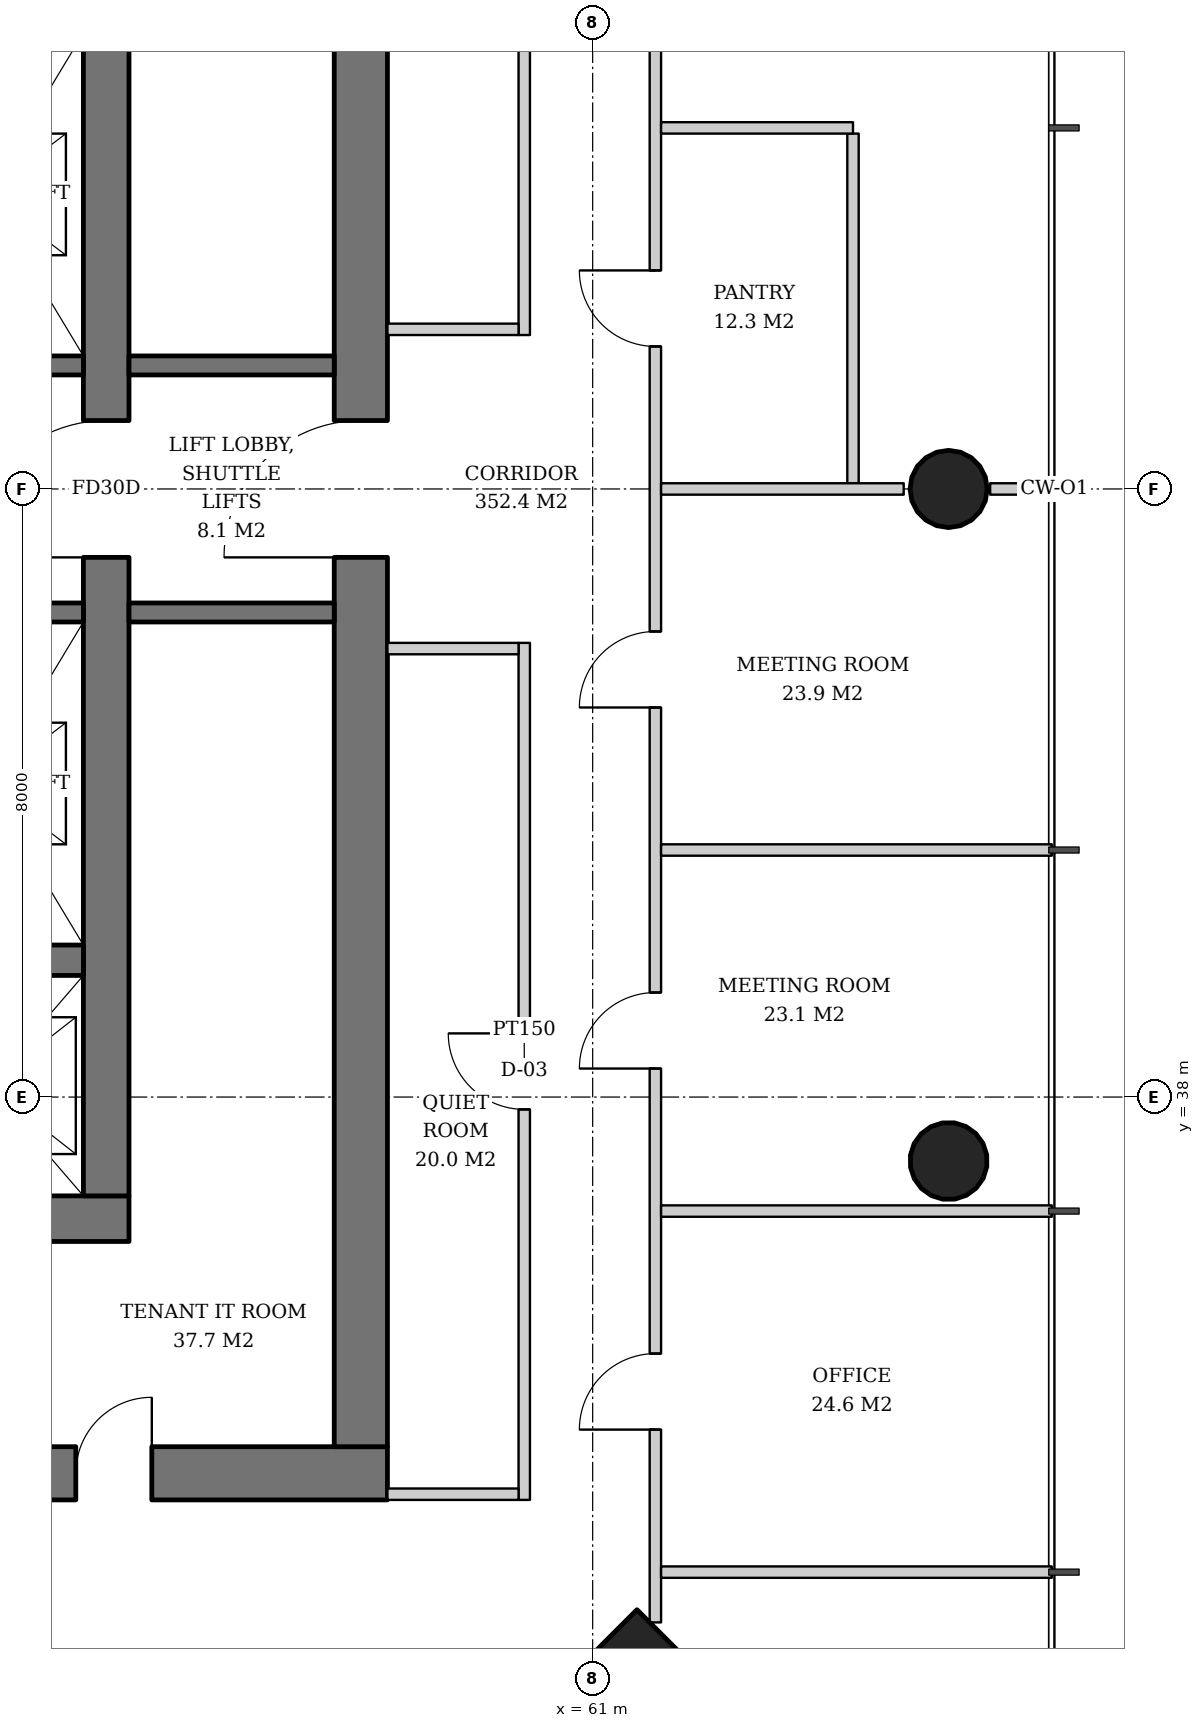
"""IFC4 building model, lengths in metres.
Left out: names, types, materials, properties, quantities, classifications, styles, units other than length and angle.
Written with IfcOpenShell. Run it as: python <this file> out.ifc"""

import sys

from ifc_helpers import new_model, si_unit, direction, frame, frame_2d, origin, origin_2d, place, context, subcontext, project, spatial, rectangle, hollow_circle, extrude, element, fill, save


model = new_model("IFC4")
c1 = context("Model", 3, precision=1e-05, world=origin(), true_north=direction((0.0, 1.0)))
c2 = subcontext(c1, "Body", "Model", "MODEL_VIEW")
j1 = project(units=[si_unit("LENGTHUNIT", "METRE"), si_unit("PLANEANGLEUNIT", "RADIAN")], contexts=[c1])
p1 = place(None, origin())
s1 = spatial("IfcSite", under=j1, at=p1, CompositionType="ELEMENT")
p2 = place(p1, origin())
s2 = spatial("IfcBuilding", under=s1, at=p2, CompositionType="ELEMENT")
p3 = place(p2, frame((0.0, 0.0, 123.6)))
s3 = spatial("IfcBuildingStorey", under=s2, at=p3, CompositionType="ELEMENT", Elevation=123.6)
p4 = place(p3, frame((65.721, 37.139, 0.0), z_axis=(-0.031912349901, 0.015924069971, 0.999363810591), x_axis=(-0.446493300058, -0.894786976326, 0.0)))
e1 = element("IfcColumn", 1, at=p4, inside=s3, PredefinedType="COLUMN", context=c2, shape_type="SweptSolid", body=[
    extrude(hollow_circle(Radius=0.508, WallThickness=0.04, at=origin_2d()), origin(), (0.0, 0.0, 1.0), 3.802),
])
p5 = place(p3, frame((65.721, 46.0, 0.0), z_axis=(-0.031916396774, 0.0, 0.999490542035), x_axis=(0.0, -1.0, 0.0)))
e2 = element("IfcColumn", 2, at=p5, inside=s3, PredefinedType="COLUMN", context=c2, shape_type="SweptSolid", body=[
    extrude(hollow_circle(Radius=0.508, WallThickness=0.04, at=origin_2d()), origin(), (0.0, 0.0, 1.0), 3.802),
])
p6 = place(p3, frame((61.621, 29.379, 0.0), z_axis=(-0.031900153262, 0.031900153262, 0.998981861919), x_axis=(-0.707106781187, -0.707106781187, 0.0)))
e3 = element("IfcColumn", 3, at=p6, inside=s3, PredefinedType="COLUMN", context=c2, shape_type="SweptSolid", body=[
    extrude(rectangle(XDim=2.6, YDim=2.6, at=origin_2d()), origin(), (0.0, 0.0, 1.0), 3.804),
])
p7 = place(p3, frame((35.1, 36.4, 0.0), z_axis=(0.0, 0.0, 1.0), x_axis=(1.0, 0.0, 0.0)))
e4 = element("IfcWall", 4, at=p7, inside=s3, PredefinedType="SHEAR", context=c2, shape_type="SweptSolid", body=[
    extrude(rectangle(XDim=19.8, YDim=0.6, at=frame_2d((9.9, 0.0))), origin(), (0.0, 0.0, 1.0), 3.8),
])
p8 = place(p7, frame((3.9, 0.0, 0.0)))
e5 = element("IfcOpeningElement", 5, at=p8, cuts=e4, PredefinedType="OPENING", context=c2, shape_type="SweptSolid", body=[
    extrude(rectangle(XDim=1.0, YDim=2.1, at=frame_2d((0.5, 1.05))), frame((0.0, 0.31, 0.0), z_axis=(0.0, -1.0, 0.0), x_axis=(1.0, 0.0, 0.0)), (0.0, 0.0, 1.0), 0.62),
])
p9 = place(p7, frame((15.35, 0.0, 0.0)))
e6 = element("IfcOpeningElement", 6, at=p9, cuts=e4, PredefinedType="OPENING", context=c2, shape_type="SweptSolid", body=[
    extrude(rectangle(XDim=1.0, YDim=2.1, at=frame_2d((0.5, 1.05))), frame((0.0, 0.31, 0.0), z_axis=(0.0, -1.0, 0.0), x_axis=(1.0, 0.0, 0.0)), (0.0, 0.0, 1.0), 0.62),
])
p10 = place(p3, frame((54.6, 36.7, 0.0), z_axis=(0.0, 0.0, 1.0), x_axis=(0.0, 1.0, 0.0)))
e7 = element("IfcWall", 7, at=p10, inside=s3, PredefinedType="SHEAR", context=c2, shape_type="SweptSolid", body=[
    extrude(rectangle(XDim=18.6, YDim=0.6, at=frame_2d((9.3, 0.0))), origin(), (0.0, 0.0, 1.0), 3.8),
])
p11 = place(p10, frame((8.4, 0.0, 0.0)))
e8 = element("IfcOpeningElement", 8, at=p11, cuts=e7, PredefinedType="OPENING", context=c2, shape_type="SweptSolid", body=[
    extrude(rectangle(XDim=1.8, YDim=2.4, at=frame_2d((0.9, 1.2))), frame((0.0, 0.31, 0.0), z_axis=(0.0, -1.0, 0.0), x_axis=(1.0, 0.0, 0.0)), (0.0, 0.0, 1.0), 0.62),
])
p12 = place(p3, frame((31.7, 33.05, 0.0), z_axis=(0.0, 0.0, 1.0), x_axis=(1.0, 0.0, 0.0)))
e9 = element("IfcWall", 9, at=p12, inside=s3, PredefinedType="SHEAR", context=c2, shape_type="SweptSolid", body=[
    extrude(rectangle(XDim=26.6, YDim=0.7, at=frame_2d((13.3, 0.0))), origin(), (0.0, 0.0, 1.0), 3.8),
])
p13 = place(p12, frame((7.3, 0.0, 0.0)))
e10 = element("IfcOpeningElement", 10, at=p13, cuts=e9, PredefinedType="OPENING", context=c2, shape_type="SweptSolid", body=[
    extrude(rectangle(XDim=1.0, YDim=2.1, at=frame_2d((0.5, 1.05))), frame((0.0, 0.36, 0.0), z_axis=(0.0, -1.0, 0.0), x_axis=(1.0, 0.0, 0.0)), (0.0, 0.0, 1.0), 0.72),
])
p14 = place(p12, frame((18.75, 0.0, 0.0)))
e11 = element("IfcOpeningElement", 11, at=p14, cuts=e9, PredefinedType="OPENING", context=c2, shape_type="SweptSolid", body=[
    extrude(rectangle(XDim=1.0, YDim=2.1, at=frame_2d((0.5, 1.05))), frame((0.0, 0.36, 0.0), z_axis=(0.0, -1.0, 0.0), x_axis=(1.0, 0.0, 0.0)), (0.0, 0.0, 1.0), 0.72),
])
p15 = place(p12, frame((3.2, 0.0, 0.0)))
e12 = element("IfcOpeningElement", 12, at=p15, cuts=e9, PredefinedType="OPENING", context=c2, shape_type="SweptSolid", body=[
    extrude(rectangle(XDim=1.0, YDim=2.1, at=frame_2d((0.5, 1.05))), frame((0.0, 0.36, 0.0), z_axis=(0.0, -1.0, 0.0), x_axis=(1.0, 0.0, 0.0)), (0.0, 0.0, 1.0), 0.72),
])
p16 = place(p12, frame((10.42, 0.0, 0.0)))
e13 = element("IfcOpeningElement", 13, at=p16, cuts=e9, PredefinedType="OPENING", context=c2, shape_type="SweptSolid", body=[
    extrude(rectangle(XDim=1.0, YDim=2.1, at=frame_2d((0.5, 1.05))), frame((0.0, 0.36, 0.0), z_axis=(0.0, -1.0, 0.0), x_axis=(1.0, 0.0, 0.0)), (0.0, 0.0, 1.0), 0.72),
])
p17 = place(p12, frame((14.46, 0.0, 0.0)))
e14 = element("IfcOpeningElement", 14, at=p17, cuts=e9, PredefinedType="OPENING", context=c2, shape_type="SweptSolid", body=[
    extrude(rectangle(XDim=1.0, YDim=2.1, at=frame_2d((0.5, 1.05))), frame((0.0, 0.36, 0.0), z_axis=(0.0, -1.0, 0.0), x_axis=(1.0, 0.0, 0.0)), (0.0, 0.0, 1.0), 0.72),
])
p18 = place(p12, frame((22.5, 0.0, 0.0)))
e15 = element("IfcOpeningElement", 15, at=p18, cuts=e9, PredefinedType="OPENING", context=c2, shape_type="SweptSolid", body=[
    extrude(rectangle(XDim=1.0, YDim=2.1, at=frame_2d((0.5, 1.05))), frame((0.0, 0.36, 0.0), z_axis=(0.0, -1.0, 0.0), x_axis=(1.0, 0.0, 0.0)), (0.0, 0.0, 1.0), 0.72),
])
p19 = place(p3, frame((57.95, 33.4, 0.0), z_axis=(0.0, 0.0, 1.0), x_axis=(0.0, 1.0, 0.0)))
e16 = element("IfcWall", 16, at=p19, inside=s3, PredefinedType="SHEAR", context=c2, shape_type="SweptSolid", body=[
    extrude(rectangle(XDim=25.2, YDim=0.7, at=frame_2d((12.6, 0.0))), origin(), (0.0, 0.0, 1.0), 3.8),
])
p20 = place(p19, frame((11.7, 0.0, 0.0)))
e17 = element("IfcOpeningElement", 17, at=p20, cuts=e16, PredefinedType="OPENING", context=c2, shape_type="SweptSolid", body=[
    extrude(rectangle(XDim=1.8, YDim=2.4, at=frame_2d((0.9, 1.2))), frame((0.0, 0.36, 0.0), z_axis=(0.0, -1.0, 0.0), x_axis=(1.0, 0.0, 0.0)), (0.0, 0.0, 1.0), 0.72),
])
p21 = place(p3, frame((35.7, 39.8, 0.0), z_axis=(0.0, 0.0, 1.0), x_axis=(1.0, 0.0, 0.0)))
e18 = element("IfcWall", 18, at=p21, inside=s3, PredefinedType="SHEAR", context=c2, shape_type="SweptSolid", body=[
    extrude(rectangle(XDim=18.6, YDim=0.4, at=frame_2d((9.3, 0.0))), origin(), (0.0, 0.0, 1.0), 3.8),
])
for number, where, z_axis, x_axis in (
    (19, (48.93, 47.625, 0.0), (0.0, 0.0, 1.0), (1.0, 0.0, 0.0)),
    (20, (48.93, 44.375, 0.0), (0.0, 0.0, 1.0), (1.0, 0.0, 0.0)),
):
    element("IfcWall", number, at=place(p3, frame(where, z_axis=z_axis, x_axis=x_axis)), inside=s3, PredefinedType="SHEAR", context=c2, shape_type="SweptSolid", body=[
        extrude(rectangle(XDim=5.37, YDim=0.25, at=frame_2d((2.685, 0.0))), origin(), (0.0, 0.0, 1.0), 3.8),
    ])
for number, where, z_axis, x_axis in (
    (21, (54.9, 44.375, 0.0), (0.0, 0.0, 1.0), (1.0, 0.0, 0.0)),
    (22, (54.9, 47.625, 0.0), (0.0, 0.0, 1.0), (1.0, 0.0, 0.0)),
):
    element("IfcWall", number, at=place(p3, frame(where, z_axis=z_axis, x_axis=x_axis)), inside=s3, PredefinedType="SOLIDWALL", context=c2, shape_type="SweptSolid", body=[
        extrude(rectangle(XDim=2.7, YDim=0.25, at=frame_2d((1.35, 0.0))), origin(), (0.0, 0.0, 1.0), 3.62),
    ])
p22 = place(p3, frame((60.1, 32.7, 0.0), z_axis=(0.0, 0.0, 1.0), x_axis=(0.0, 1.0, 0.0)))
e23 = element("IfcWall", 23, at=p22, inside=s3, PredefinedType="PARTITIONING", context=c2, shape_type="SweptSolid", body=[
    extrude(rectangle(XDim=11.275, YDim=0.15, at=frame_2d((5.638, 0.0))), origin(), (0.0, 0.0, 1.0), 2.72),
])
p23 = place(p22, frame((5.137, 0.0, 0.0)))
e24 = element("IfcOpeningElement", 24, at=p23, cuts=e23, PredefinedType="OPENING", context=c2, shape_type="SweptSolid", body=[
    extrude(rectangle(XDim=1.0, YDim=2.1, at=frame_2d((0.5, 1.05))), frame((0.0, 0.085, 0.0), z_axis=(0.0, -1.0, 0.0), x_axis=(1.0, 0.0, 0.0)), (0.0, 0.0, 1.0), 0.17),
])
for number, where, z_axis, x_axis in (
    (25, (58.3, 32.775, 0.0), (0.0, 0.0, 1.0), (1.0, 0.0, 0.0)),
    (26, (58.3, 43.9, 0.0), (0.0, 0.0, 1.0), (1.0, 0.0, 0.0)),
):
    element("IfcWall", number, at=place(p3, frame(where, z_axis=z_axis, x_axis=x_axis)), inside=s3, PredefinedType="PARTITIONING", context=c2, shape_type="SweptSolid", body=[
        extrude(rectangle(XDim=1.725, YDim=0.15, at=frame_2d((0.862, 0.0))), origin(), (0.0, 0.0, 1.0), 3.62),
    ])
p24 = place(p3, frame((60.1, 48.025, 0.0), z_axis=(0.0, 0.0, 1.0), x_axis=(0.0, 1.0, 0.0)))
e27 = element("IfcWall", 27, at=p24, inside=s3, PredefinedType="PARTITIONING", context=c2, shape_type="SweptSolid", body=[
    extrude(rectangle(XDim=11.275, YDim=0.15, at=frame_2d((5.638, 0.0))), origin(), (0.0, 0.0, 1.0), 2.806),
])
p25 = place(p24, frame((5.137, 0.0, 0.0)))
e28 = element("IfcOpeningElement", 28, at=p25, cuts=e27, PredefinedType="OPENING", context=c2, shape_type="SweptSolid", body=[
    extrude(rectangle(XDim=1.0, YDim=2.1, at=frame_2d((0.5, 1.05))), frame((0.0, 0.085, 0.0), z_axis=(0.0, -1.0, 0.0), x_axis=(1.0, 0.0, 0.0)), (0.0, 0.0, 1.0), 0.17),
])
p26 = place(p3, frame((58.3, 48.1, 0.0), z_axis=(0.0, 0.0, 1.0), x_axis=(1.0, 0.0, 0.0)))
e29 = element("IfcWall", 29, at=p26, inside=s3, PredefinedType="PARTITIONING", context=c2, shape_type="SweptSolid", body=[
    extrude(rectangle(XDim=1.725, YDim=0.15, at=frame_2d((0.862, 0.0))), origin(), (0.0, 0.0, 1.0), 3.62),
])
p27 = place(p3, frame((64.425, 46.075, 0.0), z_axis=(0.0, 0.0, 1.0), x_axis=(0.0, 1.0, 0.0)))
e30 = element("IfcWall", 30, at=p27, inside=s3, PredefinedType="PARTITIONING", context=c2, shape_type="SweptSolid", body=[
    extrude(rectangle(XDim=4.6, YDim=0.15, at=frame_2d((2.3, 0.0))), origin(), (0.0, 0.0, 1.0), 2.858),
])
p28 = place(p3, frame((61.825, 31.088, 0.0), z_axis=(0.0, 0.0, 1.0), x_axis=(0.0, 1.0, 0.0)))
e31 = element("IfcWall", 31, at=p28, inside=s3, PredefinedType="PARTITIONING", context=c2, shape_type="SweptSolid", body=[
    extrude(rectangle(XDim=29.823, YDim=0.15, at=frame_2d((14.912, 0.0))), origin(), (0.0, 0.0, 1.0), 2.72),
])
p29 = place(p28, frame((2.537, 0.0, 0.0)))
e32 = element("IfcOpeningElement", 32, at=p29, cuts=e31, PredefinedType="OPENING", context=c2, shape_type="SweptSolid", body=[
    extrude(rectangle(XDim=1.0, YDim=2.1, at=frame_2d((0.5, 1.05))), frame((0.0, 0.085, 0.0), z_axis=(0.0, -1.0, 0.0), x_axis=(1.0, 0.0, 0.0)), (0.0, 0.0, 1.0), 0.17),
])
p30 = place(p28, frame((7.287, 0.0, 0.0)))
e33 = element("IfcOpeningElement", 33, at=p30, cuts=e31, PredefinedType="OPENING", context=c2, shape_type="SweptSolid", body=[
    extrude(rectangle(XDim=1.0, YDim=2.1, at=frame_2d((0.5, 1.05))), frame((0.0, 0.085, 0.0), z_axis=(0.0, -1.0, 0.0), x_axis=(1.0, 0.0, 0.0)), (0.0, 0.0, 1.0), 0.17),
])
p31 = place(p28, frame((12.037, 0.0, 0.0)))
e34 = element("IfcOpeningElement", 34, at=p31, cuts=e31, PredefinedType="OPENING", context=c2, shape_type="SweptSolid", body=[
    extrude(rectangle(XDim=1.0, YDim=2.1, at=frame_2d((0.5, 1.05))), frame((0.0, 0.085, 0.0), z_axis=(0.0, -1.0, 0.0), x_axis=(1.0, 0.0, 0.0)), (0.0, 0.0, 1.0), 0.17),
])
p32 = place(p28, frame((16.787, 0.0, 0.0)))
e35 = element("IfcOpeningElement", 35, at=p32, cuts=e31, PredefinedType="OPENING", context=c2, shape_type="SweptSolid", body=[
    extrude(rectangle(XDim=1.0, YDim=2.1, at=frame_2d((0.5, 1.05))), frame((0.0, 0.085, 0.0), z_axis=(0.0, -1.0, 0.0), x_axis=(1.0, 0.0, 0.0)), (0.0, 0.0, 1.0), 0.17),
])
p33 = place(p28, frame((21.537, 0.0, 0.0)))
e36 = element("IfcOpeningElement", 36, at=p33, cuts=e31, PredefinedType="OPENING", context=c2, shape_type="SweptSolid", body=[
    extrude(rectangle(XDim=1.0, YDim=2.1, at=frame_2d((0.5, 1.05))), frame((0.0, 0.085, 0.0), z_axis=(0.0, -1.0, 0.0), x_axis=(1.0, 0.0, 0.0)), (0.0, 0.0, 1.0), 0.17),
])
for number, where, z_axis, x_axis in (
    (37, (61.9, 31.75, 0.0), (0.0, 0.0, 1.0), (1.0, 0.0, 0.0)),
    (38, (61.9, 36.5, 0.0), (0.0, 0.0, 1.0), (1.0, 0.0, 0.0)),
):
    element("IfcWall", number, at=place(p3, frame(where, z_axis=z_axis, x_axis=x_axis)), inside=s3, PredefinedType="PARTITIONING", context=c2, shape_type="SweptSolid", body=[
        extrude(rectangle(XDim=5.14, YDim=0.15, at=frame_2d((2.57, 0.0))), origin(), (0.0, 0.0, 1.0), 2.82),
    ])
p34 = place(p3, frame((61.9, 41.25, 0.0), z_axis=(0.0, 0.0, 1.0), x_axis=(1.0, 0.0, 0.0)))
e39 = element("IfcWall", 39, at=p34, inside=s3, PredefinedType="PARTITIONING", context=c2, shape_type="SweptSolid", body=[
    extrude(rectangle(XDim=5.14, YDim=0.15, at=frame_2d((2.57, 0.0))), origin(), (0.0, 0.0, 1.0), 2.67),
])
p35 = place(p3, frame((61.9, 46.0, 0.0), z_axis=(0.0, 0.0, 1.0), x_axis=(1.0, 0.0, 0.0)))
e40 = element("IfcWall", 40, at=p35, inside=s3, PredefinedType="PARTITIONING", context=c2, shape_type="SweptSolid", body=[
    extrude(rectangle(XDim=3.192, YDim=0.15, at=frame_2d((1.596, 0.0))), origin(), (0.0, 0.0, 1.0), 2.67),
])
p36 = place(p3, frame((66.229, 46.0, 0.0), z_axis=(0.0, 0.0, 1.0), x_axis=(1.0, 0.0, 0.0)))
e41 = element("IfcWall", 41, at=p36, inside=s3, PredefinedType="PARTITIONING", context=c2, shape_type="SweptSolid", body=[
    extrude(rectangle(XDim=0.811, YDim=0.15, at=frame_2d((0.405, 0.0))), origin(), (0.0, 0.0, 1.0), 2.67),
])
p37 = place(p3, frame((61.9, 50.75, 0.0), z_axis=(0.0, 0.0, 1.0), x_axis=(1.0, 0.0, 0.0)))
e42 = element("IfcWall", 42, at=p37, inside=s3, PredefinedType="PARTITIONING", context=c2, shape_type="SweptSolid", body=[
    extrude(rectangle(XDim=2.525, YDim=0.15, at=frame_2d((1.263, 0.0))), origin(), (0.0, 0.0, 1.0), 3.62),
])
p38 = place(p11, origin())
e43 = element("IfcDoor", 43, at=p38, inside=s3, OperationType="DOUBLE_DOOR_SINGLE_SWING", PredefinedType="DOOR", context=c2, shape_type="SweptSolid", body=[
    extrude(rectangle(XDim=1.8, YDim=2.4, at=frame_2d((0.9, 1.2))), frame((0.0, 0.025, 0.0), z_axis=(0.0, -1.0, 0.0), x_axis=(1.0, 0.0, 0.0)), (0.0, 0.0, 1.0), 0.05),
])
fill(e8, e43)
p39 = place(p20, origin())
e44 = element("IfcDoor", 44, at=p39, inside=s3, OperationType="DOUBLE_DOOR_SINGLE_SWING", PredefinedType="DOOR", context=c2, shape_type="SweptSolid", body=[
    extrude(rectangle(XDim=1.8, YDim=2.4, at=frame_2d((0.9, 1.2))), frame((0.0, 0.025, 0.0), z_axis=(0.0, -1.0, 0.0), x_axis=(1.0, 0.0, 0.0)), (0.0, 0.0, 1.0), 0.05),
])
fill(e17, e44)
p40 = place(p18, origin())
e45 = element("IfcDoor", 45, at=p40, inside=s3, OperationType="SINGLE_SWING_RIGHT", PredefinedType="DOOR", context=c2, shape_type="SweptSolid", body=[
    extrude(rectangle(XDim=1.0, YDim=2.1, at=frame_2d((0.5, 1.05))), frame((0.0, 0.34, 0.0), z_axis=(0.0, -1.0, 0.0), x_axis=(1.0, 0.0, 0.0)), (0.0, 0.0, 1.0), 0.05),
])
fill(e15, e45)
p41 = place(p23, origin())
e46 = element("IfcDoor", 46, at=p41, inside=s3, OperationType="SINGLE_SWING_RIGHT", PredefinedType="DOOR", context=c2, shape_type="SweptSolid", body=[
    extrude(rectangle(XDim=1.0, YDim=2.1, at=frame_2d((0.5, 1.05))), frame((0.0, 0.025, 0.0), z_axis=(0.0, -1.0, 0.0), x_axis=(1.0, 0.0, 0.0)), (0.0, 0.0, 1.0), 0.05),
])
fill(e24, e46)
p42 = place(p29, origin())
e47 = element("IfcDoor", 47, at=p42, inside=s3, OperationType="SINGLE_SWING_LEFT", PredefinedType="DOOR", context=c2, shape_type="SweptSolid", body=[
    extrude(rectangle(XDim=1.0, YDim=2.1, at=frame_2d((0.5, 1.05))), frame((0.0, 0.025, 0.0), z_axis=(0.0, -1.0, 0.0), x_axis=(1.0, 0.0, 0.0)), (0.0, 0.0, 1.0), 0.05),
])
fill(e32, e47)
p43 = place(p30, origin())
e48 = element("IfcDoor", 48, at=p43, inside=s3, OperationType="SINGLE_SWING_LEFT", PredefinedType="DOOR", context=c2, shape_type="SweptSolid", body=[
    extrude(rectangle(XDim=1.0, YDim=2.1, at=frame_2d((0.5, 1.05))), frame((0.0, 0.025, 0.0), z_axis=(0.0, -1.0, 0.0), x_axis=(1.0, 0.0, 0.0)), (0.0, 0.0, 1.0), 0.05),
])
fill(e33, e48)
p44 = place(p31, origin())
e49 = element("IfcDoor", 49, at=p44, inside=s3, OperationType="SINGLE_SWING_LEFT", PredefinedType="DOOR", context=c2, shape_type="SweptSolid", body=[
    extrude(rectangle(XDim=1.0, YDim=2.1, at=frame_2d((0.5, 1.05))), frame((0.0, 0.025, 0.0), z_axis=(0.0, -1.0, 0.0), x_axis=(1.0, 0.0, 0.0)), (0.0, 0.0, 1.0), 0.05),
])
fill(e34, e49)
p45 = place(p32, origin())
e50 = element("IfcDoor", 50, at=p45, inside=s3, OperationType="SINGLE_SWING_RIGHT", PredefinedType="DOOR", context=c2, shape_type="SweptSolid", body=[
    extrude(rectangle(XDim=1.0, YDim=2.1, at=frame_2d((0.5, 1.05))), frame((0.0, 0.025, 0.0), z_axis=(0.0, -1.0, 0.0), x_axis=(1.0, 0.0, 0.0)), (0.0, 0.0, 1.0), 0.05),
])
fill(e35, e50)
save(model, sys.argv[1])
